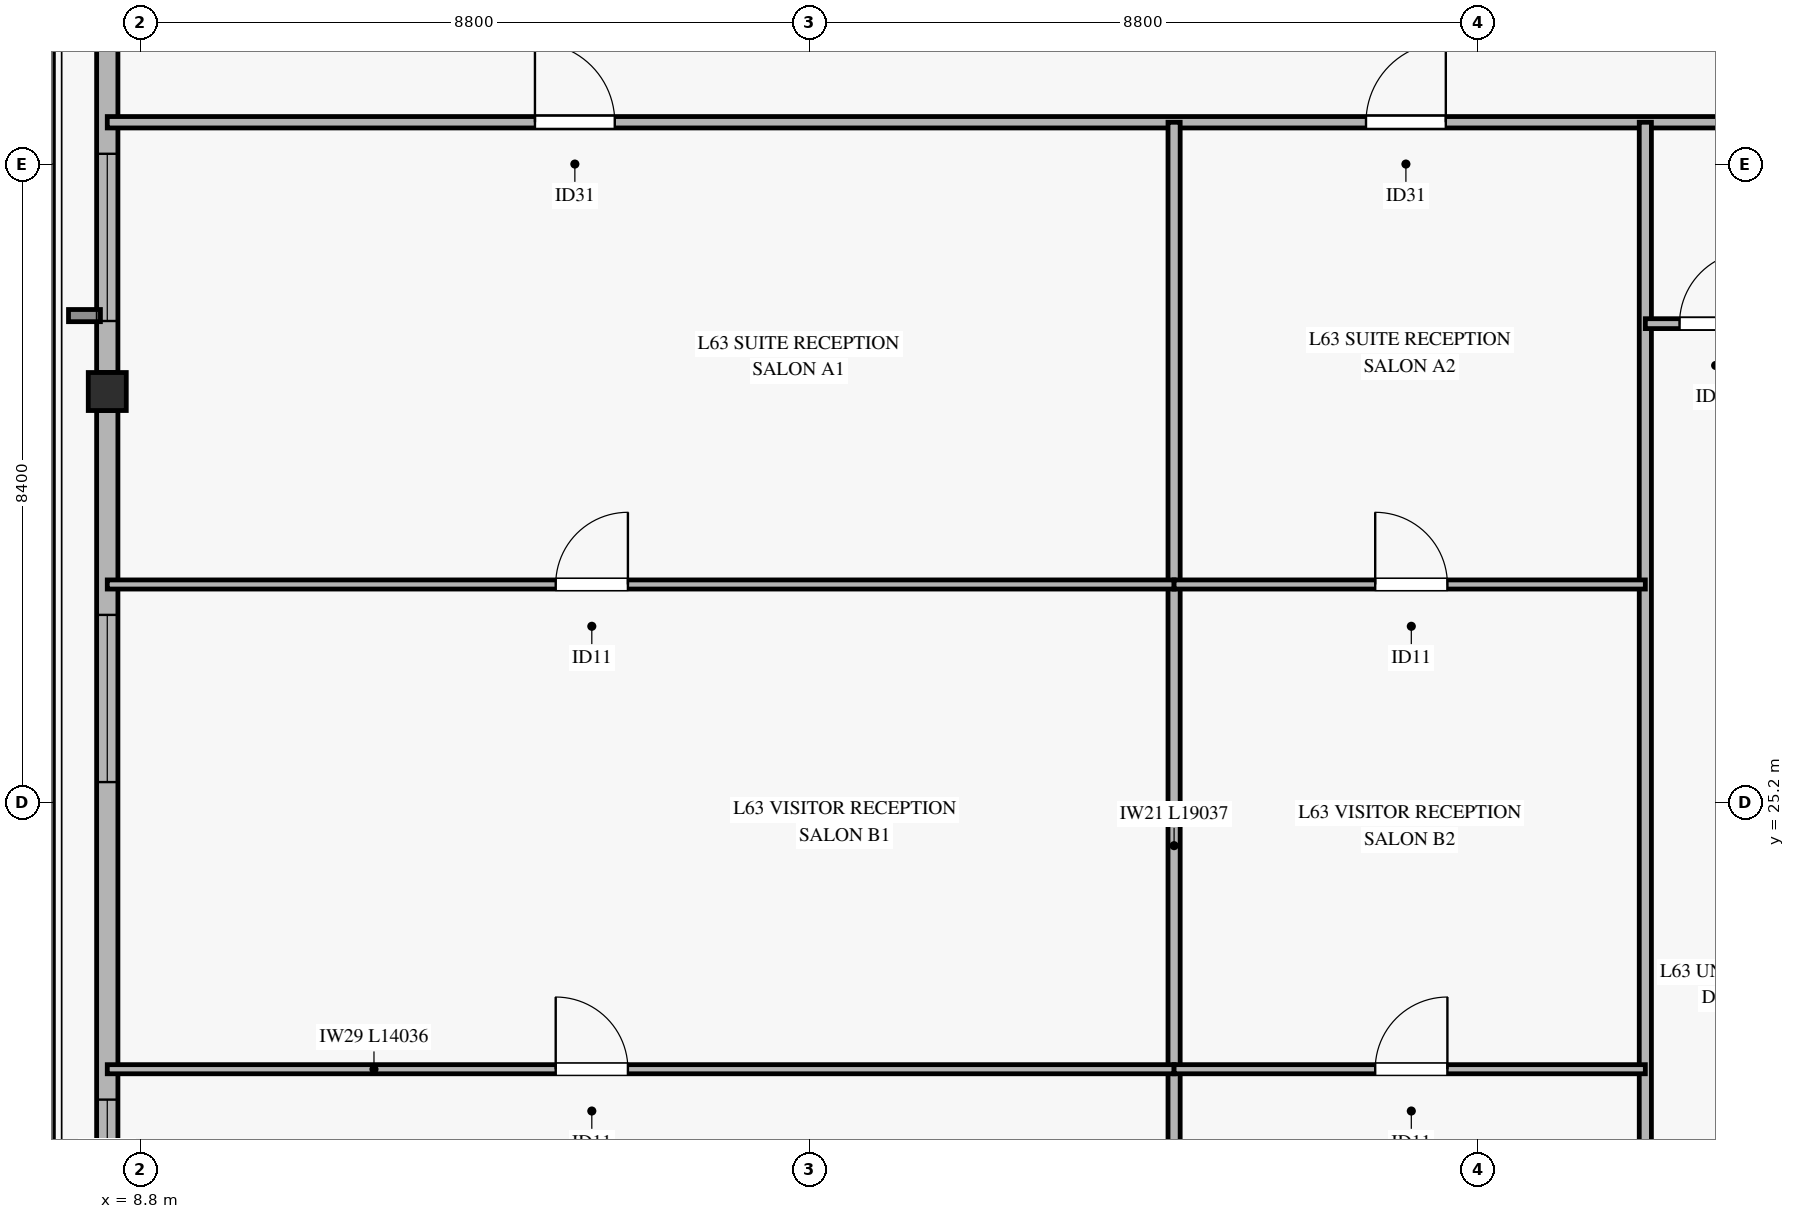
"""IFC4 building model, lengths in metres.
Left out: names, types, materials, properties, quantities, classifications, styles, units other than length and angle.
Written with IfcOpenShell. Run it as: python <this file> out.ifc"""

import sys

from ifc_helpers import new_model, si_unit, direction, frame, frame_2d, origin, origin_2d, place, context, subcontext, project, spatial, rectangle, hollow_rectangle, extrude, source, transform, mapped, element, fill, save


model = new_model("IFC4")
c1 = context("Model", 3, precision=1e-05, world=origin(), true_north=direction((0.0, 1.0)))
c2 = subcontext(c1, "Body", "Model", "MODEL_VIEW")
j1 = project(units=[si_unit("LENGTHUNIT", "METRE"), si_unit("PLANEANGLEUNIT", "RADIAN")], contexts=[c1])
p1 = place(None, origin())
s1 = spatial("IfcSite", under=j1, at=p1, CompositionType="ELEMENT")
p2 = place(p1, origin())
s2 = spatial("IfcBuilding", under=s1, at=p2, CompositionType="ELEMENT")
p3 = place(p2, frame((0.0, 0.0, 248.5)))
s3 = spatial("IfcBuildingStorey", under=s2, at=p3, CompositionType="ELEMENT", Elevation=248.5)
m1 = source(origin(), c2, "Body", "SweptSolid", [
    extrude(hollow_rectangle(XDim=0.5, YDim=0.5, WallThickness=0.024, at=origin_2d()), origin(), (0.0, 0.0, 1.0), 3.185),
])
p4 = place(p3, frame((8.364, 30.607, 0.0), z_axis=(0.0, 0.0, 1.0), x_axis=(1.0, 0.0, 0.0)))
e1 = element("IfcColumn", 1, at=p4, inside=s3, PredefinedType="COLUMN", context=c2, shape_type="MappedRepresentation", body=[
    mapped(m1, transform((0.0, 0.0, 0.0), x_axis=(1.0, 0.0, 0.0), y_axis=(0.0, 1.0, 0.0), z_axis=(0.0, 0.0, 1.0), scale=1.0)),
])
p5 = place(p3, frame((8.364, 17.728, 0.0), z_axis=(0.0, 0.0, 1.0), x_axis=(0.0, 1.0, 0.0)))
e2 = element("IfcWall", 2, at=p5, inside=s3, PredefinedType="SOLIDWALL", context=c2, shape_type="SweptSolid", body=[
    extrude(rectangle(XDim=12.629, YDim=0.28, at=frame_2d((6.314, 0.0))), origin(), (0.0, 0.0, 1.0), 2.815),
])
p6 = place(p5, frame((1.362, 0.0, 0.45)))
e3 = element("IfcOpeningElement", 3, at=p6, cuts=e2, PredefinedType="OPENING", context=c2, shape_type="SweptSolid", body=[
    extrude(rectangle(XDim=2.2, YDim=2.1, at=frame_2d((1.1, 1.05))), frame((0.0, 0.15, 0.0), z_axis=(0.0, -1.0, 0.0), x_axis=(1.0, 0.0, 0.0)), (0.0, 0.0, 1.0), 0.3),
])
p7 = place(p5, frame((7.74, 0.0, 0.45)))
e4 = element("IfcOpeningElement", 4, at=p7, cuts=e2, PredefinedType="OPENING", context=c2, shape_type="SweptSolid", body=[
    extrude(rectangle(XDim=2.2, YDim=2.1, at=frame_2d((1.1, 1.05))), frame((0.0, 0.15, 0.0), z_axis=(0.0, -1.0, 0.0), x_axis=(1.0, 0.0, 0.0)), (0.0, 0.0, 1.0), 0.3),
])
p8 = place(p3, frame((8.364, 30.857, 0.0), z_axis=(0.0, 0.0, 1.0), x_axis=(0.0, 1.0, 0.0)))
e5 = element("IfcWall", 5, at=p8, inside=s3, PredefinedType="SOLIDWALL", context=c2, shape_type="SweptSolid", body=[
    extrude(rectangle(XDim=12.628, YDim=0.28, at=frame_2d((6.314, 0.0))), origin(), (0.0, 0.0, 1.0), 2.815),
])
p9 = place(p8, frame((0.678, 0.0, 0.45)))
e6 = element("IfcOpeningElement", 6, at=p9, cuts=e5, PredefinedType="OPENING", context=c2, shape_type="SweptSolid", body=[
    extrude(rectangle(XDim=2.2, YDim=2.1, at=frame_2d((1.1, 1.05))), frame((0.0, 0.15, 0.0), z_axis=(0.0, -1.0, 0.0), x_axis=(1.0, 0.0, 0.0)), (0.0, 0.0, 1.0), 0.3),
])
p10 = place(p3, frame((8.364, 34.15, 0.0), z_axis=(0.0, 0.0, 1.0), x_axis=(1.0, 0.0, 0.0)))
e7 = element("IfcWall", 7, at=p10, inside=s3, PredefinedType="PARTITIONING", context=c2, shape_type="SweptSolid", body=[
    extrude(rectangle(XDim=53.673, YDim=0.15, at=frame_2d((26.836, 0.0))), origin(), (0.0, 0.0, 1.0), 2.47),
])
p11 = place(p10, frame((5.627, 0.0, 0.0)))
e8 = element("IfcOpeningElement", 8, at=p11, cuts=e7, PredefinedType="OPENING", context=c2, shape_type="SweptSolid", body=[
    extrude(rectangle(XDim=1.05, YDim=2.15, at=frame_2d((0.525, 1.075))), frame((0.0, 0.085, 0.0), z_axis=(0.0, -1.0, 0.0), x_axis=(1.0, 0.0, 0.0)), (0.0, 0.0, 1.0), 0.17),
])
p12 = place(p10, frame((16.561, 0.0, 0.0)))
e9 = element("IfcOpeningElement", 9, at=p12, cuts=e7, PredefinedType="OPENING", context=c2, shape_type="SweptSolid", body=[
    extrude(rectangle(XDim=1.05, YDim=2.15, at=frame_2d((0.525, 1.075))), frame((0.0, 0.085, 0.0), z_axis=(0.0, -1.0, 0.0), x_axis=(1.0, 0.0, 0.0)), (0.0, 0.0, 1.0), 0.17),
])
p13 = place(p10, frame((23.011, 0.0, 0.0)))
e10 = element("IfcOpeningElement", 10, at=p13, cuts=e7, PredefinedType="OPENING", context=c2, shape_type="SweptSolid", body=[
    extrude(rectangle(XDim=1.05, YDim=2.15, at=frame_2d((0.525, 1.075))), frame((0.0, 0.085, 0.0), z_axis=(0.0, -1.0, 0.0), x_axis=(1.0, 0.0, 0.0)), (0.0, 0.0, 1.0), 0.17),
])
p14 = place(p10, frame((29.411, 0.0, 0.0)))
e11 = element("IfcOpeningElement", 11, at=p14, cuts=e7, PredefinedType="OPENING", context=c2, shape_type="SweptSolid", body=[
    extrude(rectangle(XDim=1.05, YDim=2.15, at=frame_2d((0.525, 1.075))), frame((0.0, 0.085, 0.0), z_axis=(0.0, -1.0, 0.0), x_axis=(1.0, 0.0, 0.0)), (0.0, 0.0, 1.0), 0.17),
])
p15 = place(p10, frame((36.511, 0.0, 0.0)))
e12 = element("IfcOpeningElement", 12, at=p15, cuts=e7, PredefinedType="OPENING", context=c2, shape_type="SweptSolid", body=[
    extrude(rectangle(XDim=1.05, YDim=2.15, at=frame_2d((0.525, 1.075))), frame((0.0, 0.085, 0.0), z_axis=(0.0, -1.0, 0.0), x_axis=(1.0, 0.0, 0.0)), (0.0, 0.0, 1.0), 0.17),
])
p16 = place(p10, frame((45.807, 0.0, 0.0)))
e13 = element("IfcOpeningElement", 13, at=p16, cuts=e7, PredefinedType="OPENING", context=c2, shape_type="SweptSolid", body=[
    extrude(rectangle(XDim=1.05, YDim=2.15, at=frame_2d((0.525, 1.075))), frame((0.0, 0.085, 0.0), z_axis=(0.0, -1.0, 0.0), x_axis=(1.0, 0.0, 0.0)), (0.0, 0.0, 1.0), 0.17),
])
for number, where, z_axis, x_axis in (
    (14, (22.4, 15.113, 0.0), (0.0, 0.0, 1.0), (0.0, 1.0, 0.0)),
    (15, (28.6, 15.113, 0.0), (0.0, 0.0, 1.0), (0.0, 1.0, 0.0)),
):
    element("IfcWall", number, at=place(p3, frame(where, z_axis=z_axis, x_axis=x_axis)), inside=s3, PredefinedType="PARTITIONING", context=c2, shape_type="SweptSolid", body=[
        extrude(rectangle(XDim=19.037, YDim=0.16, at=frame_2d((9.519, 0.0))), origin(), (0.0, 0.0, 1.0), 2.77),
    ])
p17 = place(p3, frame((8.364, 21.69, 0.0), z_axis=(0.0, 0.0, 1.0), x_axis=(1.0, 0.0, 0.0)))
e16 = element("IfcWall", 16, at=p17, inside=s3, PredefinedType="PARTITIONING", context=c2, shape_type="SweptSolid", body=[
    extrude(rectangle(XDim=14.036, YDim=0.12, at=frame_2d((7.018, 0.0))), origin(), (0.0, 0.0, 1.0), 2.47),
])
p18 = place(p17, frame((5.9, 0.0, 0.0)))
e17 = element("IfcOpeningElement", 17, at=p18, cuts=e16, PredefinedType="OPENING", context=c2, shape_type="SweptSolid", body=[
    extrude(rectangle(XDim=0.95, YDim=2.1, at=frame_2d((0.475, 1.05))), frame((0.0, 0.07, 0.0), z_axis=(0.0, -1.0, 0.0), x_axis=(1.0, 0.0, 0.0)), (0.0, 0.0, 1.0), 0.14),
])
p19 = place(p3, frame((8.364, 28.068, 0.0), z_axis=(0.0, 0.0, 1.0), x_axis=(1.0, 0.0, 0.0)))
e18 = element("IfcWall", 18, at=p19, inside=s3, PredefinedType="PARTITIONING", context=c2, shape_type="SweptSolid", body=[
    extrude(rectangle(XDim=14.036, YDim=0.12, at=frame_2d((7.018, 0.0))), origin(), (0.0, 0.0, 1.0), 2.47),
])
p20 = place(p19, frame((5.9, 0.0, 0.0)))
e19 = element("IfcOpeningElement", 19, at=p20, cuts=e18, PredefinedType="OPENING", context=c2, shape_type="SweptSolid", body=[
    extrude(rectangle(XDim=0.95, YDim=2.1, at=frame_2d((0.475, 1.05))), frame((0.0, 0.07, 0.0), z_axis=(0.0, -1.0, 0.0), x_axis=(1.0, 0.0, 0.0)), (0.0, 0.0, 1.0), 0.14),
])
p21 = place(p3, frame((22.4, 21.69, 0.0), z_axis=(0.0, 0.0, 1.0), x_axis=(1.0, 0.0, 0.0)))
e20 = element("IfcWall", 20, at=p21, inside=s3, PredefinedType="PARTITIONING", context=c2, shape_type="SweptSolid", body=[
    extrude(rectangle(XDim=6.2, YDim=0.12, at=frame_2d((3.1, 0.0))), origin(), (0.0, 0.0, 1.0), 3.185),
])
p22 = place(p21, frame((2.646, 0.0, 0.0)))
e21 = element("IfcOpeningElement", 21, at=p22, cuts=e20, PredefinedType="OPENING", context=c2, shape_type="SweptSolid", body=[
    extrude(rectangle(XDim=0.95, YDim=2.1, at=frame_2d((0.475, 1.05))), frame((0.0, 0.07, 0.0), z_axis=(0.0, -1.0, 0.0), x_axis=(1.0, 0.0, 0.0)), (0.0, 0.0, 1.0), 0.14),
])
p23 = place(p3, frame((22.4, 28.068, 0.0), z_axis=(0.0, 0.0, 1.0), x_axis=(1.0, 0.0, 0.0)))
e22 = element("IfcWall", 22, at=p23, inside=s3, PredefinedType="PARTITIONING", context=c2, shape_type="SweptSolid", body=[
    extrude(rectangle(XDim=6.2, YDim=0.12, at=frame_2d((3.1, 0.0))), origin(), (0.0, 0.0, 1.0), 3.185),
])
p24 = place(p23, frame((2.646, 0.0, 0.0)))
e23 = element("IfcOpeningElement", 23, at=p24, cuts=e22, PredefinedType="OPENING", context=c2, shape_type="SweptSolid", body=[
    extrude(rectangle(XDim=0.95, YDim=2.1, at=frame_2d((0.475, 1.05))), frame((0.0, 0.07, 0.0), z_axis=(0.0, -1.0, 0.0), x_axis=(1.0, 0.0, 0.0)), (0.0, 0.0, 1.0), 0.14),
])
p25 = place(p3, frame((28.6, 31.5, 0.0), z_axis=(0.0, 0.0, 1.0), x_axis=(1.0, 0.0, 0.0)))
e24 = element("IfcWall", 24, at=p25, inside=s3, PredefinedType="PARTITIONING", context=c2, shape_type="SweptSolid", body=[
    extrude(rectangle(XDim=1.64, YDim=0.13, at=frame_2d((0.82, 0.0))), origin(), (0.0, 0.0, 1.0), 3.185),
])
p26 = place(p25, frame((0.45, 0.0, 0.0)))
e25 = element("IfcOpeningElement", 25, at=p26, cuts=e24, PredefinedType="OPENING", context=c2, shape_type="SweptSolid", body=[
    extrude(rectangle(XDim=0.95, YDim=2.1, at=frame_2d((0.475, 1.05))), frame((0.0, 0.075, 0.0), z_axis=(0.0, -1.0, 0.0), x_axis=(1.0, 0.0, 0.0)), (0.0, 0.0, 1.0), 0.15),
])
m2 = source(origin(), c2, "Body", "SweptSolid", [
    extrude(rectangle(XDim=2.2, YDim=2.1, at=frame_2d((1.1, 1.05))), frame((0.0, 0.03, 0.0), z_axis=(0.0, -1.0, 0.0), x_axis=(1.0, 0.0, 0.0)), (0.0, 0.0, 1.0), 0.06),
])
p27 = place(p6, origin())
e26 = element("IfcWindow", 26, at=p27, inside=s3, PartitioningType="SINGLE_PANEL", PredefinedType="WINDOW", context=c2, shape_type="MappedRepresentation", body=[
    mapped(m2, transform((0.0, 0.0, 0.0), x_axis=(1.0, 0.0, 0.0), y_axis=(0.0, 1.0, 0.0), z_axis=(0.0, 0.0, 1.0), scale=1.0)),
])
fill(e3, e26)
p28 = place(p7, origin())
e27 = element("IfcWindow", 27, at=p28, inside=s3, PartitioningType="SINGLE_PANEL", PredefinedType="WINDOW", context=c2, shape_type="MappedRepresentation", body=[
    mapped(m2, transform((0.0, 0.0, 0.0), x_axis=(1.0, 0.0, 0.0), y_axis=(0.0, 1.0, 0.0), z_axis=(0.0, 0.0, 1.0), scale=1.0)),
])
fill(e4, e27)
p29 = place(p9, origin())
e28 = element("IfcWindow", 28, at=p29, inside=s3, PartitioningType="SINGLE_PANEL", PredefinedType="WINDOW", context=c2, shape_type="MappedRepresentation", body=[
    mapped(m2, transform((0.0, 0.0, 0.0), x_axis=(1.0, 0.0, 0.0), y_axis=(0.0, 1.0, 0.0), z_axis=(0.0, 0.0, 1.0), scale=1.0)),
])
fill(e6, e28)
m3 = source(origin(), c2, "Body", "SweptSolid", [
    extrude(rectangle(XDim=1.05, YDim=2.15, at=frame_2d((0.525, 1.075))), frame((0.0, 0.025, 0.0), z_axis=(0.0, -1.0, 0.0), x_axis=(1.0, 0.0, 0.0)), (0.0, 0.0, 1.0), 0.05),
])
p30 = place(p11, origin())
e29 = element("IfcDoor", 29, at=p30, inside=s3, OperationType="SINGLE_SWING_LEFT", PredefinedType="DOOR", context=c2, shape_type="MappedRepresentation", body=[
    mapped(m3, transform((0.0, 0.0, 0.0), x_axis=(1.0, 0.0, 0.0), y_axis=(0.0, 1.0, 0.0), z_axis=(0.0, 0.0, 1.0), scale=1.0)),
])
fill(e8, e29)
m4 = source(origin(), c2, "Body", "SweptSolid", [
    extrude(rectangle(XDim=0.95, YDim=2.1, at=frame_2d((0.475, 1.05))), frame((0.0, 0.025, 0.0), z_axis=(0.0, -1.0, 0.0), x_axis=(1.0, 0.0, 0.0)), (0.0, 0.0, 1.0), 0.05),
])
p31 = place(p20, origin())
e30 = element("IfcDoor", 30, at=p31, inside=s3, OperationType="SINGLE_SWING_RIGHT", PredefinedType="DOOR", context=c2, shape_type="MappedRepresentation", body=[
    mapped(m4, transform((0.0, 0.0, 0.0), x_axis=(1.0, 0.0, 0.0), y_axis=(0.0, 1.0, 0.0), z_axis=(0.0, 0.0, 1.0), scale=1.0)),
])
fill(e19, e30)
p32 = place(p18, origin())
e31 = element("IfcDoor", 31, at=p32, inside=s3, OperationType="SINGLE_SWING_LEFT", PredefinedType="DOOR", context=c2, shape_type="MappedRepresentation", body=[
    mapped(m4, transform((0.0, 0.0, 0.0), x_axis=(1.0, 0.0, 0.0), y_axis=(0.0, 1.0, 0.0), z_axis=(0.0, 0.0, 1.0), scale=1.0)),
])
fill(e17, e31)
p33 = place(p12, origin())
e32 = element("IfcDoor", 32, at=p33, inside=s3, OperationType="SINGLE_SWING_RIGHT", PredefinedType="DOOR", context=c2, shape_type="MappedRepresentation", body=[
    mapped(m3, transform((0.0, 0.0, 0.0), x_axis=(1.0, 0.0, 0.0), y_axis=(0.0, 1.0, 0.0), z_axis=(0.0, 0.0, 1.0), scale=1.0)),
])
fill(e9, e32)
p34 = place(p24, origin())
e33 = element("IfcDoor", 33, at=p34, inside=s3, OperationType="SINGLE_SWING_LEFT", PredefinedType="DOOR", context=c2, shape_type="MappedRepresentation", body=[
    mapped(m4, transform((0.0, 0.0, 0.0), x_axis=(1.0, 0.0, 0.0), y_axis=(0.0, 1.0, 0.0), z_axis=(0.0, 0.0, 1.0), scale=1.0)),
])
fill(e23, e33)
p35 = place(p22, origin())
e34 = element("IfcDoor", 34, at=p35, inside=s3, OperationType="SINGLE_SWING_RIGHT", PredefinedType="DOOR", context=c2, shape_type="MappedRepresentation", body=[
    mapped(m4, transform((0.0, 0.0, 0.0), x_axis=(1.0, 0.0, 0.0), y_axis=(0.0, 1.0, 0.0), z_axis=(0.0, 0.0, 1.0), scale=1.0)),
])
fill(e21, e34)
p36 = place(p26, origin())
e35 = element("IfcDoor", 35, at=p36, inside=s3, OperationType="SINGLE_SWING_RIGHT", PredefinedType="DOOR", context=c2, shape_type="MappedRepresentation", body=[
    mapped(m4, transform((0.0, 0.0, 0.0), x_axis=(1.0, 0.0, 0.0), y_axis=(0.0, 1.0, 0.0), z_axis=(0.0, 0.0, 1.0), scale=1.0)),
])
fill(e25, e35)
save(model, sys.argv[1])
